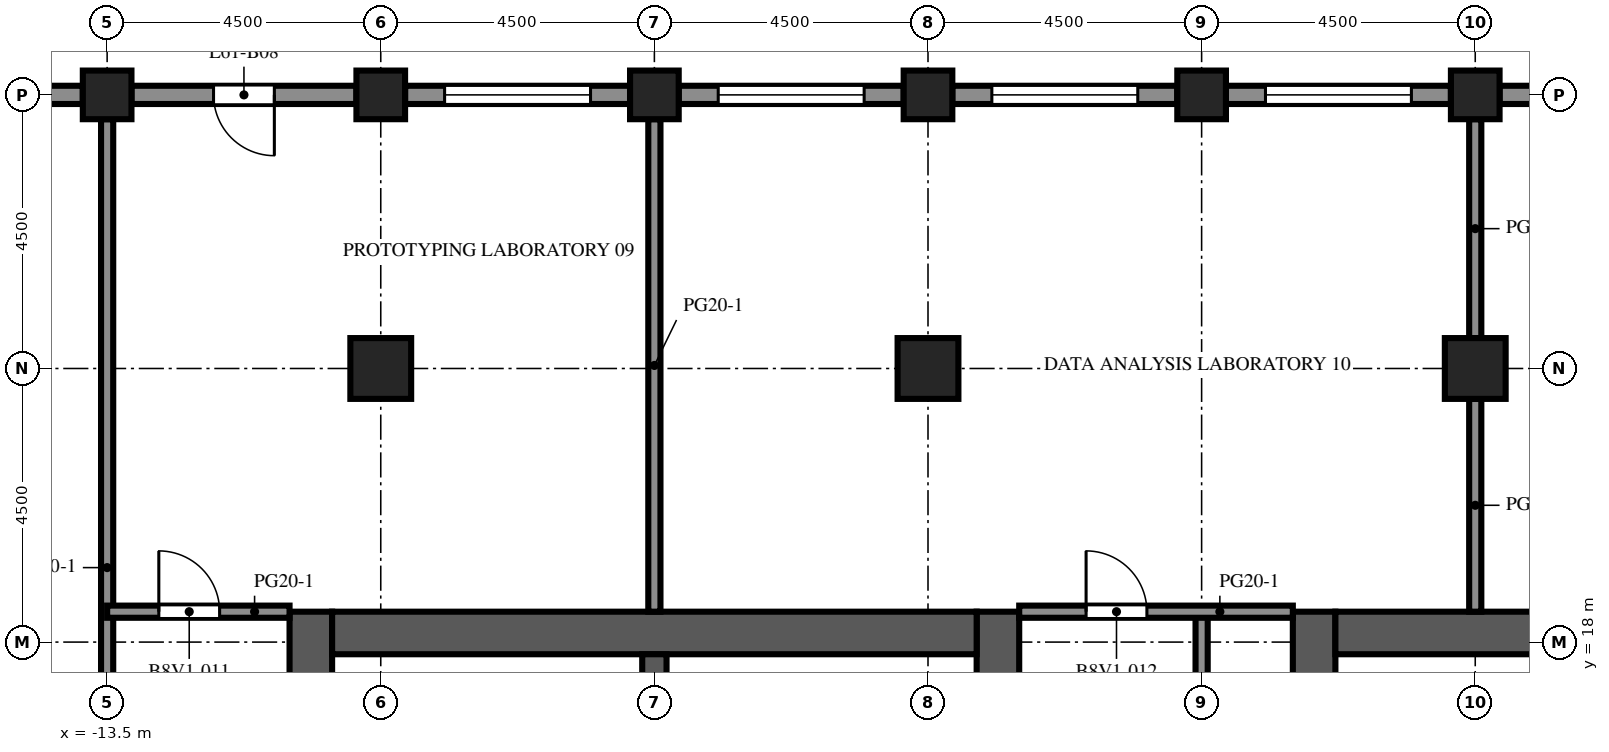
"""IFC4 building model, lengths in metres.
Left out: names, types, materials, properties, quantities, classifications, styles, units other than length and angle.
Written with IfcOpenShell. Run it as: python <this file> out.ifc"""

import sys

from ifc_helpers import new_model, si_unit, direction, frame, frame_2d, origin, origin_2d, place, context, subcontext, project, spatial, rectangle, extrude, element, fill, save


model = new_model("IFC4")
c1 = context("Model", 3, precision=1e-05, world=origin(), true_north=direction((0.0, 1.0)))
c2 = subcontext(c1, "Body", "Model", "MODEL_VIEW")
j1 = project(units=[si_unit("LENGTHUNIT", "METRE"), si_unit("PLANEANGLEUNIT", "RADIAN")], contexts=[c1])
p1 = place(None, origin())
s1 = spatial("IfcSite", under=j1, at=p1, CompositionType="ELEMENT")
p2 = place(p1, origin())
s2 = spatial("IfcBuilding", under=s1, at=p2, CompositionType="ELEMENT")
p3 = place(p2, frame((0.0, 0.0, 270.4)))
s3 = spatial("IfcBuildingStorey", under=s2, at=p3, CompositionType="ELEMENT", Elevation=270.4)
for number, where, z_axis, x_axis in (
    (1, (-13.5, 27.0, 0.0), (0.0, 0.0, 1.0), (1.0, 0.0, 0.0)),
    (2, (-9.0, 27.0, 0.0), (0.0, 0.0, 1.0), (1.0, 0.0, 0.0)),
    (3, (-4.5, 27.0, 0.0), (0.0, 0.0, 1.0), (1.0, 0.0, 0.0)),
    (4, (0.0, 27.0, 0.0), (0.0, 0.0, 1.0), (1.0, 0.0, 0.0)),
    (5, (4.5, 27.0, 0.0), (0.0, 0.0, 1.0), (1.0, 0.0, 0.0)),
    (6, (9.0, 27.0, 0.0), (0.0, 0.0, 1.0), (1.0, 0.0, 0.0)),
):
    element("IfcColumn", number, at=place(p3, frame(where, z_axis=z_axis, x_axis=x_axis)), inside=s3, PredefinedType="COLUMN", context=c2, shape_type="SweptSolid", body=[
        extrude(rectangle(XDim=0.8, YDim=0.8, at=origin_2d()), origin(), (0.0, 0.0, 1.0), 4.1),
    ])
for number, where, z_axis, x_axis in (
    (7, (-9.0, 22.5, 0.0), (0.0, 0.0, 1.0), (1.0, 0.0, 0.0)),
    (8, (0.0, 22.5, 0.0), (0.0, 0.0, 1.0), (1.0, 0.0, 0.0)),
    (9, (9.0, 22.5, 0.0), (0.0, 0.0, 1.0), (1.0, 0.0, 0.0)),
):
    element("IfcColumn", number, at=place(p3, frame(where, z_axis=z_axis, x_axis=x_axis)), inside=s3, PredefinedType="COLUMN", context=c2, shape_type="SweptSolid", body=[
        extrude(rectangle(XDim=1.0, YDim=1.0, at=origin_2d()), origin(), (0.0, 0.0, 1.0), 4.1),
    ])
p4 = place(p3, frame((-10.15, -9.0, 0.0), z_axis=(0.0, 0.0, 1.0), x_axis=(0.0, 1.0, 0.0)))
e10 = element("IfcWall", 10, at=p4, inside=s3, PredefinedType="SHEAR", context=c2, shape_type="SweptSolid", body=[
    extrude(rectangle(XDim=27.5, YDim=0.7, at=frame_2d((13.75, 0.0))), origin(), (0.0, 0.0, 1.0), 4.1),
])
p5 = place(p4, frame((12.55, 0.0, 0.0)))
e11 = element("IfcOpeningElement", 11, at=p5, cuts=e10, PredefinedType="OPENING", context=c2, shape_type="SweptSolid", body=[
    extrude(rectangle(XDim=2.4, YDim=2.4, at=frame_2d((1.2, 1.2))), frame((0.0, 0.36, 0.0), z_axis=(0.0, -1.0, 0.0), x_axis=(1.0, 0.0, 0.0)), (0.0, 0.0, 1.0), 0.72),
])
p6 = place(p4, frame((6.825, 0.0, 0.0)))
e12 = element("IfcOpeningElement", 12, at=p6, cuts=e10, PredefinedType="OPENING", context=c2, shape_type="SweptSolid", body=[
    extrude(rectangle(XDim=1.2, YDim=2.1, at=frame_2d((0.6, 1.05))), frame((0.0, 0.36, 0.0), z_axis=(0.0, -1.0, 0.0), x_axis=(1.0, 0.0, 0.0)), (0.0, 0.0, 1.0), 0.72),
])
p7 = place(p4, frame((19.475, 0.0, 0.0)))
e13 = element("IfcOpeningElement", 13, at=p7, cuts=e10, PredefinedType="OPENING", context=c2, shape_type="SweptSolid", body=[
    extrude(rectangle(XDim=1.2, YDim=2.1, at=frame_2d((0.6, 1.05))), frame((0.0, 0.36, 0.0), z_axis=(0.0, -1.0, 0.0), x_axis=(1.0, 0.0, 0.0)), (0.0, 0.0, 1.0), 0.72),
])
p8 = place(p3, frame((1.15, -9.0, 0.0), z_axis=(0.0, 0.0, 1.0), x_axis=(0.0, 1.0, 0.0)))
e14 = element("IfcWall", 14, at=p8, inside=s3, PredefinedType="SHEAR", context=c2, shape_type="SweptSolid", body=[
    extrude(rectangle(XDim=27.5, YDim=0.7, at=frame_2d((13.75, 0.0))), origin(), (0.0, 0.0, 1.0), 4.1),
])
p9 = place(p8, frame((12.55, 0.0, 0.0)))
e15 = element("IfcOpeningElement", 15, at=p9, cuts=e14, PredefinedType="OPENING", context=c2, shape_type="SweptSolid", body=[
    extrude(rectangle(XDim=2.4, YDim=2.4, at=frame_2d((1.2, 1.2))), frame((0.0, 0.36, 0.0), z_axis=(0.0, -1.0, 0.0), x_axis=(1.0, 0.0, 0.0)), (0.0, 0.0, 1.0), 0.72),
])
p10 = place(p8, frame((3.9, 0.0, 0.0)))
e16 = element("IfcOpeningElement", 16, at=p10, cuts=e14, PredefinedType="OPENING", context=c2, shape_type="SweptSolid", body=[
    extrude(rectangle(XDim=1.2, YDim=2.1, at=frame_2d((0.6, 1.05))), frame((0.0, 0.36, 0.0), z_axis=(0.0, -1.0, 0.0), x_axis=(1.0, 0.0, 0.0)), (0.0, 0.0, 1.0), 0.72),
])
p11 = place(p8, frame((19.46, 0.0, 0.0)))
e17 = element("IfcOpeningElement", 17, at=p11, cuts=e14, PredefinedType="OPENING", context=c2, shape_type="SweptSolid", body=[
    extrude(rectangle(XDim=1.0, YDim=2.1, at=frame_2d((0.5, 1.05))), frame((0.0, 0.36, 0.0), z_axis=(0.0, -1.0, 0.0), x_axis=(1.0, 0.0, 0.0)), (0.0, 0.0, 1.0), 0.72),
])
p12 = place(p8, frame((21.17, 0.0, 0.0)))
e18 = element("IfcOpeningElement", 18, at=p12, cuts=e14, PredefinedType="OPENING", context=c2, shape_type="SweptSolid", body=[
    extrude(rectangle(XDim=1.0, YDim=2.1, at=frame_2d((0.5, 1.05))), frame((0.0, 0.36, 0.0), z_axis=(0.0, -1.0, 0.0), x_axis=(1.0, 0.0, 0.0)), (0.0, 0.0, 1.0), 0.72),
])
p13 = place(p8, frame((23.26, 0.0, 0.0)))
e19 = element("IfcOpeningElement", 19, at=p13, cuts=e14, PredefinedType="OPENING", context=c2, shape_type="SweptSolid", body=[
    extrude(rectangle(XDim=1.0, YDim=2.1, at=frame_2d((0.5, 1.05))), frame((0.0, 0.36, 0.0), z_axis=(0.0, -1.0, 0.0), x_axis=(1.0, 0.0, 0.0)), (0.0, 0.0, 1.0), 0.72),
])
p14 = place(p8, frame((25.35, 0.0, 0.0)))
e20 = element("IfcOpeningElement", 20, at=p14, cuts=e14, PredefinedType="OPENING", context=c2, shape_type="SweptSolid", body=[
    extrude(rectangle(XDim=1.0, YDim=2.1, at=frame_2d((0.5, 1.05))), frame((0.0, 0.36, 0.0), z_axis=(0.0, -1.0, 0.0), x_axis=(1.0, 0.0, 0.0)), (0.0, 0.0, 1.0), 0.72),
])
p15 = place(p3, frame((-9.8, 18.15, 0.0), z_axis=(0.0, 0.0, 1.0), x_axis=(1.0, 0.0, 0.0)))
e21 = element("IfcWall", 21, at=p15, inside=s3, PredefinedType="SHEAR", context=c2, shape_type="SweptSolid", body=[
    extrude(rectangle(XDim=10.6, YDim=0.7, at=frame_2d((5.3, 0.0))), origin(), (0.0, 0.0, 1.0), 4.1),
])
p16 = place(p3, frame((-4.5, 10.2, 0.0), z_axis=(0.0, 0.0, 1.0), x_axis=(0.0, 1.0, 0.0)))
e22 = element("IfcWall", 22, at=p16, inside=s3, PredefinedType="SHEAR", context=c2, shape_type="SweptSolid", body=[
    extrude(rectangle(XDim=7.6, YDim=0.4, at=frame_2d((3.8, 0.0))), origin(), (0.0, 0.0, 1.0), 4.1),
])
p17 = place(p3, frame((6.35, -9.0, 0.0), z_axis=(0.0, 0.0, 1.0), x_axis=(0.0, 1.0, 0.0)))
e23 = element("IfcWall", 23, at=p17, inside=s3, PredefinedType="SHEAR", context=c2, shape_type="SweptSolid", body=[
    extrude(rectangle(XDim=27.5, YDim=0.7, at=frame_2d((13.75, 0.0))), origin(), (0.0, 0.0, 1.0), 4.1),
])
p18 = place(p17, frame((12.55, 0.0, 0.0)))
e24 = element("IfcOpeningElement", 24, at=p18, cuts=e23, PredefinedType="OPENING", context=c2, shape_type="SweptSolid", body=[
    extrude(rectangle(XDim=2.4, YDim=2.4, at=frame_2d((1.2, 1.2))), frame((0.0, 0.36, 0.0), z_axis=(0.0, -1.0, 0.0), x_axis=(1.0, 0.0, 0.0)), (0.0, 0.0, 1.0), 0.72),
])
p19 = place(p17, frame((3.9, 0.0, 0.0)))
e25 = element("IfcOpeningElement", 25, at=p19, cuts=e23, PredefinedType="OPENING", context=c2, shape_type="SweptSolid", body=[
    extrude(rectangle(XDim=1.2, YDim=2.1, at=frame_2d((0.6, 1.05))), frame((0.0, 0.36, 0.0), z_axis=(0.0, -1.0, 0.0), x_axis=(1.0, 0.0, 0.0)), (0.0, 0.0, 1.0), 0.72),
])
p20 = place(p17, frame((19.46, 0.0, 0.0)))
e26 = element("IfcOpeningElement", 26, at=p20, cuts=e23, PredefinedType="OPENING", context=c2, shape_type="SweptSolid", body=[
    extrude(rectangle(XDim=1.0, YDim=2.1, at=frame_2d((0.5, 1.05))), frame((0.0, 0.36, 0.0), z_axis=(0.0, -1.0, 0.0), x_axis=(1.0, 0.0, 0.0)), (0.0, 0.0, 1.0), 0.72),
])
p21 = place(p17, frame((21.17, 0.0, 0.0)))
e27 = element("IfcOpeningElement", 27, at=p21, cuts=e23, PredefinedType="OPENING", context=c2, shape_type="SweptSolid", body=[
    extrude(rectangle(XDim=1.0, YDim=2.1, at=frame_2d((0.5, 1.05))), frame((0.0, 0.36, 0.0), z_axis=(0.0, -1.0, 0.0), x_axis=(1.0, 0.0, 0.0)), (0.0, 0.0, 1.0), 0.72),
])
p22 = place(p17, frame((23.26, 0.0, 0.0)))
e28 = element("IfcOpeningElement", 28, at=p22, cuts=e23, PredefinedType="OPENING", context=c2, shape_type="SweptSolid", body=[
    extrude(rectangle(XDim=1.0, YDim=2.1, at=frame_2d((0.5, 1.05))), frame((0.0, 0.36, 0.0), z_axis=(0.0, -1.0, 0.0), x_axis=(1.0, 0.0, 0.0)), (0.0, 0.0, 1.0), 0.72),
])
p23 = place(p17, frame((25.35, 0.0, 0.0)))
e29 = element("IfcOpeningElement", 29, at=p23, cuts=e23, PredefinedType="OPENING", context=c2, shape_type="SweptSolid", body=[
    extrude(rectangle(XDim=1.0, YDim=2.1, at=frame_2d((0.5, 1.05))), frame((0.0, 0.36, 0.0), z_axis=(0.0, -1.0, 0.0), x_axis=(1.0, 0.0, 0.0)), (0.0, 0.0, 1.0), 0.72),
])
p24 = place(p3, frame((6.7, 18.15, 0.0), z_axis=(0.0, 0.0, 1.0), x_axis=(1.0, 0.0, 0.0)))
e30 = element("IfcWall", 30, at=p24, inside=s3, PredefinedType="SHEAR", context=c2, shape_type="SweptSolid", body=[
    extrude(rectangle(XDim=10.6, YDim=0.7, at=frame_2d((5.3, 0.0))), origin(), (0.0, 0.0, 1.0), 4.1),
])
p25 = place(p3, frame((9.4, 27.0, 0.0), z_axis=(0.0, 0.0, 1.0), x_axis=(1.0, 0.0, 0.0)))
e31 = element("IfcWall", 31, at=p25, inside=s3, PredefinedType="SOLIDWALL", context=c2, shape_type="SweptSolid", body=[
    extrude(rectangle(XDim=3.7, YDim=0.3, at=frame_2d((1.85, 0.0))), origin(), (0.0, 0.0, 1.0), 2.85),
])
p26 = place(p25, frame((1.35, 0.0, 0.0)))
e32 = element("IfcOpeningElement", 32, at=p26, cuts=e31, PredefinedType="OPENING", context=c2, shape_type="SweptSolid", body=[
    extrude(rectangle(XDim=1.0, YDim=2.2, at=frame_2d((0.5, 1.1))), frame((0.0, 0.16, 0.0), z_axis=(0.0, -1.0, 0.0), x_axis=(1.0, 0.0, 0.0)), (0.0, 0.0, 1.0), 0.32),
])
p27 = place(p3, frame((4.9, 27.0, 0.0), z_axis=(0.0, 0.0, 1.0), x_axis=(1.0, 0.0, 0.0)))
e33 = element("IfcWall", 33, at=p27, inside=s3, PredefinedType="SOLIDWALL", context=c2, shape_type="SweptSolid", body=[
    extrude(rectangle(XDim=3.7, YDim=0.3, at=frame_2d((1.85, 0.0))), origin(), (0.0, 0.0, 1.0), 2.85),
])
p28 = place(p27, frame((0.65, 0.0, 0.8)))
e34 = element("IfcOpeningElement", 34, at=p28, cuts=e33, PredefinedType="OPENING", context=c2, shape_type="SweptSolid", body=[
    extrude(rectangle(XDim=2.4, YDim=1.7, at=frame_2d((1.2, 0.85))), frame((0.0, 0.16, 0.0), z_axis=(0.0, -1.0, 0.0), x_axis=(1.0, 0.0, 0.0)), (0.0, 0.0, 1.0), 0.32),
])
p29 = place(p3, frame((0.4, 27.0, 0.0), z_axis=(0.0, 0.0, 1.0), x_axis=(1.0, 0.0, 0.0)))
e35 = element("IfcWall", 35, at=p29, inside=s3, PredefinedType="SOLIDWALL", context=c2, shape_type="SweptSolid", body=[
    extrude(rectangle(XDim=3.7, YDim=0.3, at=frame_2d((1.85, 0.0))), origin(), (0.0, 0.0, 1.0), 2.85),
])
p30 = place(p29, frame((0.65, 0.0, 0.8)))
e36 = element("IfcOpeningElement", 36, at=p30, cuts=e35, PredefinedType="OPENING", context=c2, shape_type="SweptSolid", body=[
    extrude(rectangle(XDim=2.4, YDim=1.7, at=frame_2d((1.2, 0.85))), frame((0.0, 0.16, 0.0), z_axis=(0.0, -1.0, 0.0), x_axis=(1.0, 0.0, 0.0)), (0.0, 0.0, 1.0), 0.32),
])
p31 = place(p3, frame((-4.1, 27.0, 0.0), z_axis=(0.0, 0.0, 1.0), x_axis=(1.0, 0.0, 0.0)))
e37 = element("IfcWall", 37, at=p31, inside=s3, PredefinedType="SOLIDWALL", context=c2, shape_type="SweptSolid", body=[
    extrude(rectangle(XDim=3.7, YDim=0.3, at=frame_2d((1.85, 0.0))), origin(), (0.0, 0.0, 1.0), 2.85),
])
p32 = place(p31, frame((0.65, 0.0, 0.8)))
e38 = element("IfcOpeningElement", 38, at=p32, cuts=e37, PredefinedType="OPENING", context=c2, shape_type="SweptSolid", body=[
    extrude(rectangle(XDim=2.4, YDim=1.7, at=frame_2d((1.2, 0.85))), frame((0.0, 0.16, 0.0), z_axis=(0.0, -1.0, 0.0), x_axis=(1.0, 0.0, 0.0)), (0.0, 0.0, 1.0), 0.32),
])
p33 = place(p3, frame((-8.6, 27.0, 0.0), z_axis=(0.0, 0.0, 1.0), x_axis=(1.0, 0.0, 0.0)))
e39 = element("IfcWall", 39, at=p33, inside=s3, PredefinedType="SOLIDWALL", context=c2, shape_type="SweptSolid", body=[
    extrude(rectangle(XDim=3.7, YDim=0.3, at=frame_2d((1.85, 0.0))), origin(), (0.0, 0.0, 1.0), 2.85),
])
p34 = place(p33, frame((0.65, 0.0, 0.8)))
e40 = element("IfcOpeningElement", 40, at=p34, cuts=e39, PredefinedType="OPENING", context=c2, shape_type="SweptSolid", body=[
    extrude(rectangle(XDim=2.4, YDim=1.7, at=frame_2d((1.2, 0.85))), frame((0.0, 0.16, 0.0), z_axis=(0.0, -1.0, 0.0), x_axis=(1.0, 0.0, 0.0)), (0.0, 0.0, 1.0), 0.32),
])
p35 = place(p3, frame((-13.1, 27.0, 0.0), z_axis=(0.0, 0.0, 1.0), x_axis=(1.0, 0.0, 0.0)))
e41 = element("IfcWall", 41, at=p35, inside=s3, PredefinedType="SOLIDWALL", context=c2, shape_type="SweptSolid", body=[
    extrude(rectangle(XDim=3.7, YDim=0.3, at=frame_2d((1.85, 0.0))), origin(), (0.0, 0.0, 1.0), 2.85),
])
p36 = place(p35, frame((1.35, 0.0, 0.0)))
e42 = element("IfcOpeningElement", 42, at=p36, cuts=e41, PredefinedType="OPENING", context=c2, shape_type="SweptSolid", body=[
    extrude(rectangle(XDim=1.0, YDim=2.2, at=frame_2d((0.5, 1.1))), frame((0.0, 0.16, 0.0), z_axis=(0.0, -1.0, 0.0), x_axis=(1.0, 0.0, 0.0)), (0.0, 0.0, 1.0), 0.32),
])
p37 = place(p3, frame((-17.6, 27.0, 0.0), z_axis=(0.0, 0.0, 1.0), x_axis=(1.0, 0.0, 0.0)))
e43 = element("IfcWall", 43, at=p37, inside=s3, PredefinedType="SOLIDWALL", context=c2, shape_type="SweptSolid", body=[
    extrude(rectangle(XDim=3.7, YDim=0.3, at=frame_2d((1.85, 0.0))), origin(), (0.0, 0.0, 1.0), 2.85),
])
p38 = place(p37, frame((0.65, 0.0, 0.8)))
e44 = element("IfcOpeningElement", 44, at=p38, cuts=e43, PredefinedType="OPENING", context=c2, shape_type="SweptSolid", body=[
    extrude(rectangle(XDim=2.4, YDim=1.7, at=frame_2d((1.2, 0.85))), frame((0.0, 0.16, 0.0), z_axis=(0.0, -1.0, 0.0), x_axis=(1.0, 0.0, 0.0)), (0.0, 0.0, 1.0), 0.32),
])
p39 = place(p3, frame((-13.5, 6.25, 0.0), z_axis=(0.0, 0.0, 1.0), x_axis=(0.0, 1.0, 0.0)))
e45 = element("IfcWall", 45, at=p39, inside=s3, PredefinedType="PARTITIONING", context=c2, shape_type="SweptSolid", body=[
    extrude(rectangle(XDim=20.35, YDim=0.2, at=frame_2d((10.175, 0.0))), origin(), (0.0, 0.0, 1.0), 3.65),
])
p40 = place(p39, frame((4.6, 0.0, 0.0)))
e46 = element("IfcOpeningElement", 46, at=p40, cuts=e45, PredefinedType="OPENING", context=c2, shape_type="SweptSolid", body=[
    extrude(rectangle(XDim=1.0, YDim=2.1, at=frame_2d((0.5, 1.05))), frame((0.0, 0.11, 0.0), z_axis=(0.0, -1.0, 0.0), x_axis=(1.0, 0.0, 0.0)), (0.0, 0.0, 1.0), 0.22),
])
p41 = place(p3, frame((-4.5, 18.5, 0.0), z_axis=(0.0, 0.0, 1.0), x_axis=(0.0, 1.0, 0.0)))
e47 = element("IfcWall", 47, at=p41, inside=s3, PredefinedType="PARTITIONING", context=c2, shape_type="SweptSolid", body=[
    extrude(rectangle(XDim=8.1, YDim=0.2, at=frame_2d((4.05, 0.0))), origin(), (0.0, 0.0, 1.0), 3.65),
])
p42 = place(p3, frame((4.5, 18.5, 0.0), z_axis=(0.0, 0.0, 1.0), x_axis=(0.0, -1.0, 0.0)))
e48 = element("IfcWall", 48, at=p42, inside=s3, PredefinedType="PARTITIONING", context=c2, shape_type="SweptSolid", body=[
    extrude(rectangle(XDim=11.8, YDim=0.2, at=frame_2d((5.9, 0.0))), origin(), (0.0, 0.0, 1.0), 3.65),
])
p43 = place(p42, frame((4.7, 0.0, 0.0)))
e49 = element("IfcOpeningElement", 49, at=p43, cuts=e48, PredefinedType="OPENING", context=c2, shape_type="SweptSolid", body=[
    extrude(rectangle(XDim=1.0, YDim=2.1, at=frame_2d((0.5, 1.05))), frame((0.0, 0.11, 0.0), z_axis=(0.0, -1.0, 0.0), x_axis=(1.0, 0.0, 0.0)), (0.0, 0.0, 1.0), 0.22),
])
p44 = place(p3, frame((9.0, 18.5, 0.0), z_axis=(0.0, 0.0, 1.0), x_axis=(0.0, 1.0, 0.0)))
e50 = element("IfcWall", 50, at=p44, inside=s3, PredefinedType="PARTITIONING", context=c2, shape_type="SweptSolid", body=[
    extrude(rectangle(XDim=3.5, YDim=0.2, at=frame_2d((1.75, 0.0))), origin(), (0.0, 0.0, 1.0), 3.65),
])
p45 = place(p3, frame((9.0, 23.0, 0.0), z_axis=(0.0, 0.0, 1.0), x_axis=(0.0, 1.0, 0.0)))
e51 = element("IfcWall", 51, at=p45, inside=s3, PredefinedType="PARTITIONING", context=c2, shape_type="SweptSolid", body=[
    extrude(rectangle(XDim=3.6, YDim=0.2, at=frame_2d((1.8, 0.0))), origin(), (0.0, 0.0, 1.0), 3.65),
])
p46 = place(p3, frame((-13.5, 18.5, 0.0), z_axis=(0.0, 0.0, 1.0), x_axis=(1.0, 0.0, 0.0)))
e52 = element("IfcWall", 52, at=p46, inside=s3, PredefinedType="PARTITIONING", context=c2, shape_type="SweptSolid", body=[
    extrude(rectangle(XDim=3.0, YDim=0.2, at=frame_2d((1.5, 0.0))), origin(), (0.0, 0.0, 1.0), 3.65),
])
p47 = place(p46, frame((0.85, 0.0, 0.0)))
e53 = element("IfcOpeningElement", 53, at=p47, cuts=e52, PredefinedType="OPENING", context=c2, shape_type="SweptSolid", body=[
    extrude(rectangle(XDim=1.0, YDim=2.1, at=frame_2d((0.5, 1.05))), frame((0.0, 0.11, 0.0), z_axis=(0.0, -1.0, 0.0), x_axis=(1.0, 0.0, 0.0)), (0.0, 0.0, 1.0), 0.22),
])
p48 = place(p3, frame((1.5, 18.5, 0.0), z_axis=(0.0, 0.0, 1.0), x_axis=(1.0, 0.0, 0.0)))
e54 = element("IfcWall", 54, at=p48, inside=s3, PredefinedType="PARTITIONING", context=c2, shape_type="SweptSolid", body=[
    extrude(rectangle(XDim=4.5, YDim=0.2, at=frame_2d((2.25, 0.0))), origin(), (0.0, 0.0, 1.0), 3.65),
])
p49 = place(p48, frame((1.1, 0.0, 0.0)))
e55 = element("IfcOpeningElement", 55, at=p49, cuts=e54, PredefinedType="OPENING", context=c2, shape_type="SweptSolid", body=[
    extrude(rectangle(XDim=1.0, YDim=2.1, at=frame_2d((0.5, 1.05))), frame((0.0, 0.11, 0.0), z_axis=(0.0, -1.0, 0.0), x_axis=(1.0, 0.0, 0.0)), (0.0, 0.0, 1.0), 0.22),
])
p50 = place(p28, origin())
e56 = element("IfcWindow", 56, at=p50, inside=s3, PartitioningType="SINGLE_PANEL", PredefinedType="WINDOW", context=c2, shape_type="SweptSolid", body=[
    extrude(rectangle(XDim=2.4, YDim=1.7, at=frame_2d((1.2, 0.85))), frame((0.0, 0.03, 0.0), z_axis=(0.0, -1.0, 0.0), x_axis=(1.0, 0.0, 0.0)), (0.0, 0.0, 1.0), 0.06),
])
fill(e34, e56)
p51 = place(p30, origin())
e57 = element("IfcWindow", 57, at=p51, inside=s3, PartitioningType="SINGLE_PANEL", PredefinedType="WINDOW", context=c2, shape_type="SweptSolid", body=[
    extrude(rectangle(XDim=2.4, YDim=1.7, at=frame_2d((1.2, 0.85))), frame((0.0, 0.03, 0.0), z_axis=(0.0, -1.0, 0.0), x_axis=(1.0, 0.0, 0.0)), (0.0, 0.0, 1.0), 0.06),
])
fill(e36, e57)
p52 = place(p32, origin())
e58 = element("IfcWindow", 58, at=p52, inside=s3, PartitioningType="SINGLE_PANEL", PredefinedType="WINDOW", context=c2, shape_type="SweptSolid", body=[
    extrude(rectangle(XDim=2.4, YDim=1.7, at=frame_2d((1.2, 0.85))), frame((0.0, 0.03, 0.0), z_axis=(0.0, -1.0, 0.0), x_axis=(1.0, 0.0, 0.0)), (0.0, 0.0, 1.0), 0.06),
])
fill(e38, e58)
p53 = place(p34, origin())
e59 = element("IfcWindow", 59, at=p53, inside=s3, PartitioningType="SINGLE_PANEL", PredefinedType="WINDOW", context=c2, shape_type="SweptSolid", body=[
    extrude(rectangle(XDim=2.4, YDim=1.7, at=frame_2d((1.2, 0.85))), frame((0.0, 0.03, 0.0), z_axis=(0.0, -1.0, 0.0), x_axis=(1.0, 0.0, 0.0)), (0.0, 0.0, 1.0), 0.06),
])
fill(e40, e59)
p54 = place(p36, origin())
e60 = element("IfcDoor", 60, at=p54, inside=s3, OperationType="SINGLE_SWING_RIGHT", PredefinedType="DOOR", context=c2, shape_type="SweptSolid", body=[
    extrude(rectangle(XDim=1.0, YDim=2.2, at=frame_2d((0.5, 1.1))), frame((0.0, 0.025, 0.0), z_axis=(0.0, -1.0, 0.0), x_axis=(1.0, 0.0, 0.0)), (0.0, 0.0, 1.0), 0.05),
])
fill(e42, e60)
p55 = place(p47, origin())
e61 = element("IfcDoor", 61, at=p55, inside=s3, OperationType="SINGLE_SWING_LEFT", PredefinedType="DOOR", context=c2, shape_type="SweptSolid", body=[
    extrude(rectangle(XDim=1.0, YDim=2.1, at=frame_2d((0.5, 1.05))), frame((0.0, 0.025, 0.0), z_axis=(0.0, -1.0, 0.0), x_axis=(1.0, 0.0, 0.0)), (0.0, 0.0, 1.0), 0.05),
])
fill(e53, e61)
p56 = place(p49, origin())
e62 = element("IfcDoor", 62, at=p56, inside=s3, OperationType="SINGLE_SWING_LEFT", PredefinedType="DOOR", context=c2, shape_type="SweptSolid", body=[
    extrude(rectangle(XDim=1.0, YDim=2.1, at=frame_2d((0.5, 1.05))), frame((0.0, 0.025, 0.0), z_axis=(0.0, -1.0, 0.0), x_axis=(1.0, 0.0, 0.0)), (0.0, 0.0, 1.0), 0.05),
])
fill(e55, e62)
save(model, sys.argv[1])
